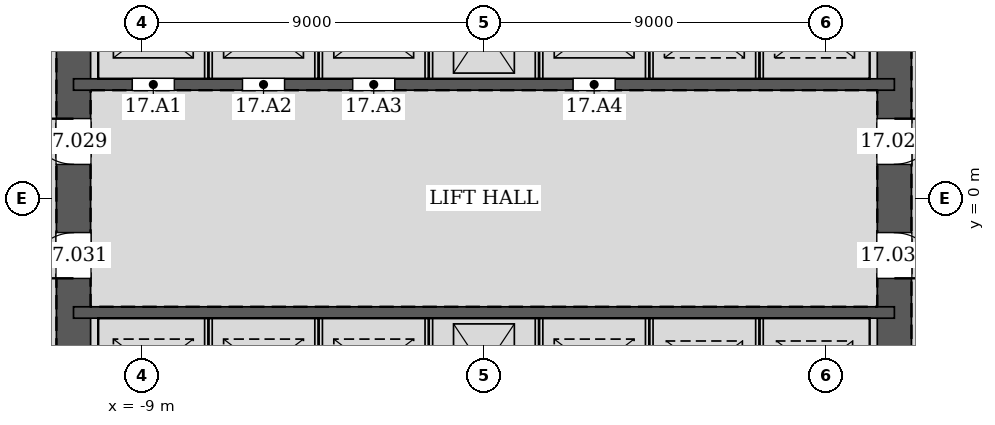
"""IFC4 building model, lengths in metres.
Left out: names, types, materials, properties, quantities, classifications, styles, units other than length and angle.
Written with IfcOpenShell. Run it as: python <this file> out.ifc"""

import sys

from ifc_helpers import new_model, si_unit, direction, frame, frame_2d, origin, place, context, subcontext, project, spatial, rectangle, extrude, element, fill, save


model = new_model("IFC4")
c1 = context("Model", 3, precision=1e-05, world=origin(), true_north=direction((0.0, 1.0)))
c2 = subcontext(c1, "Body", "Model", "MODEL_VIEW")
j1 = project(units=[si_unit("LENGTHUNIT", "METRE"), si_unit("PLANEANGLEUNIT", "RADIAN")], contexts=[c1])
p1 = place(None, origin())
s1 = spatial("IfcSite", under=j1, at=p1, CompositionType="ELEMENT")
p2 = place(p1, origin())
s2 = spatial("IfcBuilding", under=s1, at=p2, CompositionType="ELEMENT")
p3 = place(p2, frame((0.0, 0.0, 79.2)))
s3 = spatial("IfcBuildingStorey", under=s2, at=p3, CompositionType="ELEMENT", Elevation=79.2)
p4 = place(p3, frame((10.8, -10.8, 0.0), z_axis=(0.0, 0.0, 1.0), x_axis=(0.0, 1.0, 0.0)))
e1 = element("IfcWall", 1, at=p4, inside=s3, PredefinedType="SOLIDWALL", context=c2, shape_type="SweptSolid", body=[
    extrude(rectangle(XDim=21.6, YDim=0.9, at=frame_2d((10.8, 0.0))), origin(), (0.0, 0.0, 1.0), 4.2),
])
p5 = place(p4, frame((11.7, 0.0, 0.0)))
e2 = element("IfcOpeningElement", 2, at=p5, cuts=e1, PredefinedType="OPENING", context=c2, shape_type="SweptSolid", body=[
    extrude(rectangle(XDim=1.2, YDim=2.1, at=frame_2d((0.6, 1.05))), frame((0.0, 0.46, 0.0), z_axis=(0.0, -1.0, 0.0), x_axis=(1.0, 0.0, 0.0)), (0.0, 0.0, 1.0), 0.92),
])
p6 = place(p4, frame((8.7, 0.0, 0.0)))
e3 = element("IfcOpeningElement", 3, at=p6, cuts=e1, PredefinedType="OPENING", context=c2, shape_type="SweptSolid", body=[
    extrude(rectangle(XDim=1.2, YDim=2.1, at=frame_2d((0.6, 1.05))), frame((0.0, 0.46, 0.0), z_axis=(0.0, -1.0, 0.0), x_axis=(1.0, 0.0, 0.0)), (0.0, 0.0, 1.0), 0.92),
])
p7 = place(p3, frame((-10.8, 10.8, 0.0), z_axis=(0.0, 0.0, 1.0), x_axis=(0.0, -1.0, 0.0)))
e4 = element("IfcWall", 4, at=p7, inside=s3, PredefinedType="SOLIDWALL", context=c2, shape_type="SweptSolid", body=[
    extrude(rectangle(XDim=21.6, YDim=0.9, at=frame_2d((10.8, 0.0))), origin(), (0.0, 0.0, 1.0), 4.2),
])
p8 = place(p7, frame((8.7, 0.0, 0.0)))
e5 = element("IfcOpeningElement", 5, at=p8, cuts=e4, PredefinedType="OPENING", context=c2, shape_type="SweptSolid", body=[
    extrude(rectangle(XDim=1.2, YDim=2.1, at=frame_2d((0.6, 1.05))), frame((0.0, 0.46, 0.0), z_axis=(0.0, -1.0, 0.0), x_axis=(1.0, 0.0, 0.0)), (0.0, 0.0, 1.0), 0.92),
])
p9 = place(p7, frame((11.7, 0.0, 0.0)))
e6 = element("IfcOpeningElement", 6, at=p9, cuts=e4, PredefinedType="OPENING", context=c2, shape_type="SweptSolid", body=[
    extrude(rectangle(XDim=1.2, YDim=2.1, at=frame_2d((0.6, 1.05))), frame((0.0, 0.46, 0.0), z_axis=(0.0, -1.0, 0.0), x_axis=(1.0, 0.0, 0.0)), (0.0, 0.0, 1.0), 0.92),
])
p10 = place(p3, frame((-10.8, 3.0, 0.0), z_axis=(0.0, 0.0, 1.0), x_axis=(1.0, 0.0, 0.0)))
e7 = element("IfcWall", 7, at=p10, inside=s3, PredefinedType="SOLIDWALL", context=c2, shape_type="SweptSolid", body=[
    extrude(rectangle(XDim=21.6, YDim=0.3, at=frame_2d((10.8, 0.0))), origin(), (0.0, 0.0, 1.0), 4.2),
])
p11 = place(p10, frame((1.55, 0.0, 0.0)))
e8 = element("IfcOpeningElement", 8, at=p11, cuts=e7, PredefinedType="OPENING", context=c2, shape_type="SweptSolid", body=[
    extrude(rectangle(XDim=1.1, YDim=2.1, at=frame_2d((0.55, 1.05))), frame((0.0, 0.16, 0.0), z_axis=(0.0, -1.0, 0.0), x_axis=(1.0, 0.0, 0.0)), (0.0, 0.0, 1.0), 0.32),
])
p12 = place(p10, frame((4.45, 0.0, 0.0)))
e9 = element("IfcOpeningElement", 9, at=p12, cuts=e7, PredefinedType="OPENING", context=c2, shape_type="SweptSolid", body=[
    extrude(rectangle(XDim=1.1, YDim=2.1, at=frame_2d((0.55, 1.05))), frame((0.0, 0.16, 0.0), z_axis=(0.0, -1.0, 0.0), x_axis=(1.0, 0.0, 0.0)), (0.0, 0.0, 1.0), 0.32),
])
p13 = place(p10, frame((7.35, 0.0, 0.0)))
e10 = element("IfcOpeningElement", 10, at=p13, cuts=e7, PredefinedType="OPENING", context=c2, shape_type="SweptSolid", body=[
    extrude(rectangle(XDim=1.1, YDim=2.1, at=frame_2d((0.55, 1.05))), frame((0.0, 0.16, 0.0), z_axis=(0.0, -1.0, 0.0), x_axis=(1.0, 0.0, 0.0)), (0.0, 0.0, 1.0), 0.32),
])
p14 = place(p10, frame((13.15, 0.0, 0.0)))
e11 = element("IfcOpeningElement", 11, at=p14, cuts=e7, PredefinedType="OPENING", context=c2, shape_type="SweptSolid", body=[
    extrude(rectangle(XDim=1.1, YDim=2.1, at=frame_2d((0.55, 1.05))), frame((0.0, 0.16, 0.0), z_axis=(0.0, -1.0, 0.0), x_axis=(1.0, 0.0, 0.0)), (0.0, 0.0, 1.0), 0.32),
])
p15 = place(p3, frame((-10.8, -3.0, 0.0), z_axis=(0.0, 0.0, 1.0), x_axis=(1.0, 0.0, 0.0)))
e12 = element("IfcWall", 12, at=p15, inside=s3, PredefinedType="SOLIDWALL", context=c2, shape_type="SweptSolid", body=[
    extrude(rectangle(XDim=21.6, YDim=0.3, at=frame_2d((10.8, 0.0))), origin(), (0.0, 0.0, 1.0), 4.2),
])
for number, where, z_axis, x_axis in (
    (13, (-7.25, 3.15, 0.0), (0.0, 0.0, 1.0), (0.0, 1.0, 0.0)),
    (14, (-4.35, 3.15, 0.0), (0.0, 0.0, 1.0), (0.0, 1.0, 0.0)),
    (15, (-1.45, 3.15, 0.0), (0.0, 0.0, 1.0), (0.0, 1.0, 0.0)),
    (16, (1.45, 3.15, 0.0), (0.0, 0.0, 1.0), (0.0, 1.0, 0.0)),
    (17, (4.35, 3.15, 0.0), (0.0, 0.0, 1.0), (0.0, 1.0, 0.0)),
    (18, (7.25, 3.15, 0.0), (0.0, 0.0, 1.0), (0.0, 1.0, 0.0)),
    (19, (-7.25, -5.85, 0.0), (0.0, 0.0, 1.0), (0.0, 1.0, 0.0)),
    (20, (-4.35, -5.85, 0.0), (0.0, 0.0, 1.0), (0.0, 1.0, 0.0)),
    (21, (-1.45, -5.85, 0.0), (0.0, 0.0, 1.0), (0.0, 1.0, 0.0)),
    (22, (1.45, -5.85, 0.0), (0.0, 0.0, 1.0), (0.0, 1.0, 0.0)),
    (23, (4.35, -5.85, 0.0), (0.0, 0.0, 1.0), (0.0, 1.0, 0.0)),
    (24, (7.25, -5.85, 0.0), (0.0, 0.0, 1.0), (0.0, 1.0, 0.0)),
):
    element("IfcWall", number, at=place(p3, frame(where, z_axis=z_axis, x_axis=x_axis)), inside=s3, PredefinedType="PARTITIONING", context=c2, shape_type="SweptSolid", body=[
        extrude(rectangle(XDim=2.7, YDim=0.2, at=frame_2d((1.35, 0.0))), origin(), (0.0, 0.0, 1.0), 4.2),
    ])
p16 = place(p5, frame((1.2, 0.0, 0.0), z_axis=(0.0, 0.0, 1.0), x_axis=(-1.0, 0.0, 0.0)))
e25 = element("IfcDoor", 25, at=p16, inside=s3, OperationType="SINGLE_SWING_LEFT", PredefinedType="DOOR", context=c2, shape_type="SweptSolid", body=[
    extrude(rectangle(XDim=1.2, YDim=2.1, at=frame_2d((0.6, 1.05))), frame((0.0, 0.025, 0.0), z_axis=(0.0, -1.0, 0.0), x_axis=(1.0, 0.0, 0.0)), (0.0, 0.0, 1.0), 0.05),
])
fill(e2, e25)
p17 = place(p8, frame((1.2, 0.0, 0.0), z_axis=(0.0, 0.0, 1.0), x_axis=(-1.0, 0.0, 0.0)))
e26 = element("IfcDoor", 26, at=p17, inside=s3, OperationType="SINGLE_SWING_RIGHT", PredefinedType="DOOR", context=c2, shape_type="SweptSolid", body=[
    extrude(rectangle(XDim=1.2, YDim=2.1, at=frame_2d((0.6, 1.05))), frame((0.0, 0.025, 0.0), z_axis=(0.0, -1.0, 0.0), x_axis=(1.0, 0.0, 0.0)), (0.0, 0.0, 1.0), 0.05),
])
fill(e5, e26)
p18 = place(p6, frame((1.2, 0.0, 0.0), z_axis=(0.0, 0.0, 1.0), x_axis=(-1.0, 0.0, 0.0)))
e27 = element("IfcDoor", 27, at=p18, inside=s3, OperationType="SINGLE_SWING_RIGHT", PredefinedType="DOOR", context=c2, shape_type="SweptSolid", body=[
    extrude(rectangle(XDim=1.2, YDim=2.1, at=frame_2d((0.6, 1.05))), frame((0.0, 0.025, 0.0), z_axis=(0.0, -1.0, 0.0), x_axis=(1.0, 0.0, 0.0)), (0.0, 0.0, 1.0), 0.05),
])
fill(e3, e27)
p19 = place(p9, frame((1.2, 0.0, 0.0), z_axis=(0.0, 0.0, 1.0), x_axis=(-1.0, 0.0, 0.0)))
e28 = element("IfcDoor", 28, at=p19, inside=s3, OperationType="SINGLE_SWING_LEFT", PredefinedType="DOOR", context=c2, shape_type="SweptSolid", body=[
    extrude(rectangle(XDim=1.2, YDim=2.1, at=frame_2d((0.6, 1.05))), frame((0.0, 0.025, 0.0), z_axis=(0.0, -1.0, 0.0), x_axis=(1.0, 0.0, 0.0)), (0.0, 0.0, 1.0), 0.05),
])
fill(e6, e28)
p20 = place(p11, origin())
e29 = element("IfcDoor", 29, at=p20, inside=s3, OperationType="DOUBLE_DOOR_SLIDING", PredefinedType="DOOR", context=c2, shape_type="SweptSolid", body=[
    extrude(rectangle(XDim=1.1, YDim=2.1, at=frame_2d((0.55, 1.05))), frame((0.0, 0.025, 0.0), z_axis=(0.0, -1.0, 0.0), x_axis=(1.0, 0.0, 0.0)), (0.0, 0.0, 1.0), 0.05),
])
fill(e8, e29)
p21 = place(p12, origin())
e30 = element("IfcDoor", 30, at=p21, inside=s3, OperationType="DOUBLE_DOOR_SLIDING", PredefinedType="DOOR", context=c2, shape_type="SweptSolid", body=[
    extrude(rectangle(XDim=1.1, YDim=2.1, at=frame_2d((0.55, 1.05))), frame((0.0, 0.025, 0.0), z_axis=(0.0, -1.0, 0.0), x_axis=(1.0, 0.0, 0.0)), (0.0, 0.0, 1.0), 0.05),
])
fill(e9, e30)
p22 = place(p13, origin())
e31 = element("IfcDoor", 31, at=p22, inside=s3, OperationType="DOUBLE_DOOR_SLIDING", PredefinedType="DOOR", context=c2, shape_type="SweptSolid", body=[
    extrude(rectangle(XDim=1.1, YDim=2.1, at=frame_2d((0.55, 1.05))), frame((0.0, 0.025, 0.0), z_axis=(0.0, -1.0, 0.0), x_axis=(1.0, 0.0, 0.0)), (0.0, 0.0, 1.0), 0.05),
])
fill(e10, e31)
p23 = place(p14, origin())
e32 = element("IfcDoor", 32, at=p23, inside=s3, OperationType="DOUBLE_DOOR_SLIDING", PredefinedType="DOOR", context=c2, shape_type="SweptSolid", body=[
    extrude(rectangle(XDim=1.1, YDim=2.1, at=frame_2d((0.55, 1.05))), frame((0.0, 0.025, 0.0), z_axis=(0.0, -1.0, 0.0), x_axis=(1.0, 0.0, 0.0)), (0.0, 0.0, 1.0), 0.05),
])
fill(e11, e32)
save(model, sys.argv[1])
